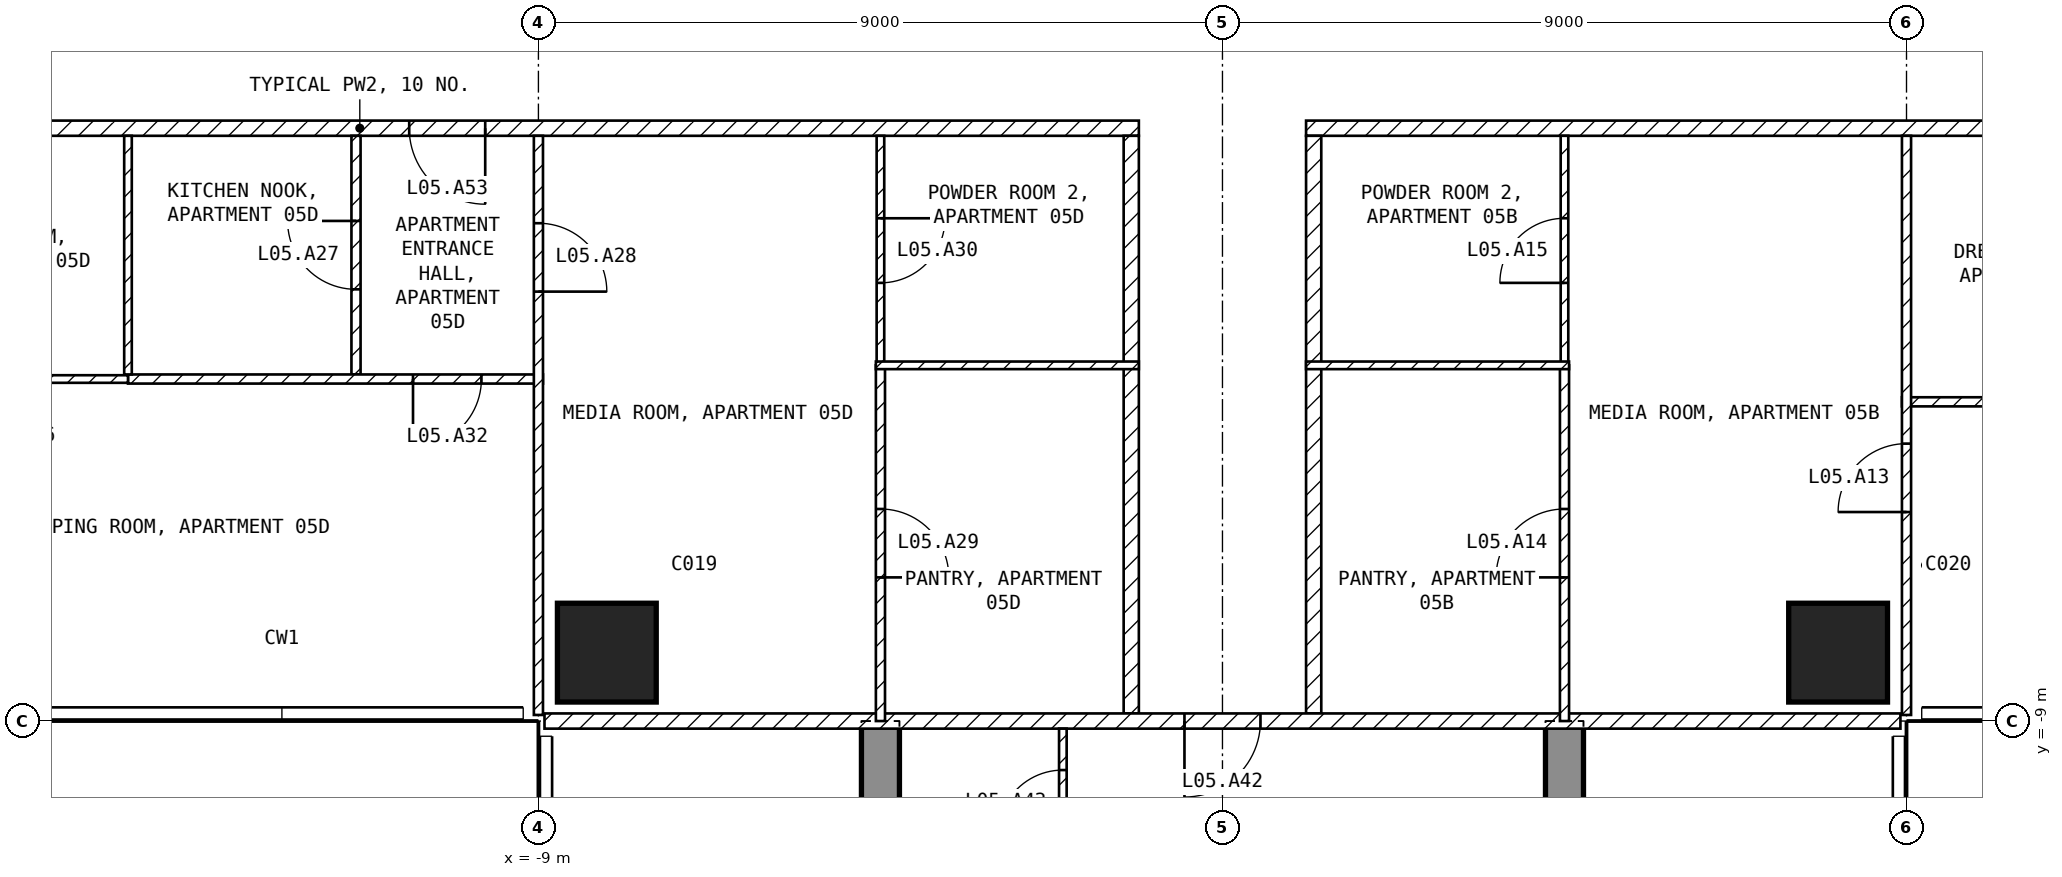
"""IFC4 building model, lengths in metres.
Left out: names, types, materials, properties, quantities, classifications, styles, units other than length and angle.
Written with IfcOpenShell. Run it as: python <this file> out.ifc"""

import sys

from ifc_helpers import new_model, si_unit, direction, frame, frame_2d, origin, origin_2d, place, context, subcontext, project, spatial, polyline, rectangle, outline, extrude, element, fill, save


model = new_model("IFC4")
c1 = context("Model", 3, precision=1e-05, world=origin(), true_north=direction((0.0, 1.0)))
c2 = subcontext(c1, "Body", "Model", "MODEL_VIEW")
j1 = project(units=[si_unit("LENGTHUNIT", "METRE"), si_unit("PLANEANGLEUNIT", "RADIAN")], contexts=[c1])
p1 = place(None, origin())
s1 = spatial("IfcSite", under=j1, at=p1, CompositionType="ELEMENT")
p2 = place(p1, origin())
s2 = spatial("IfcBuilding", under=s1, at=p2, CompositionType="ELEMENT")
p3 = place(p2, frame((0.0, 0.0, 36.5)))
s3 = spatial("IfcBuildingStorey", under=s2, at=p3, CompositionType="ELEMENT", Elevation=36.5)
for number, where, z_axis, x_axis in (
    (1, (-8.1, -8.1, -0.25), (0.0, 0.0, 1.0), (1.0, 0.0, 0.0)),
    (2, (8.1, -8.1, -0.25), (0.0, 0.0, 1.0), (1.0, 0.0, 0.0)),
):
    element("IfcColumn", number, at=place(p3, frame(where, z_axis=z_axis, x_axis=x_axis)), inside=s3, PredefinedType="COLUMN", context=c2, shape_type="SweptSolid", body=[
        extrude(rectangle(XDim=1.3, YDim=1.3, at=origin_2d()), origin(), (0.0, 0.0, 1.0), 3.5),
    ])
for number, where, z_axis, x_axis in (
    (3, (-4.75, -25.45, -0.25), (1.0, 0.0, 0.0), (0.0, 1.0, 0.0)),
    (4, (4.25, -25.45, -0.25), (1.0, 0.0, 0.0), (0.0, 1.0, 0.0)),
):
    element("IfcWall", number, at=place(p3, frame(where, z_axis=z_axis, x_axis=x_axis)), inside=s3, PredefinedType="SHEAR", context=c2, shape_type="SweptSolid", body=[
        extrude(outline(polyline([(0.0, 0.0), (4.15, 0.0), (4.15, 2.65), (6.55, 2.65), (6.55, 0.0), (11.95, 0.0), (11.95, 2.65), (14.35, 2.65), (14.35, 0.0), (16.45, 0.0), (16.45, 3.5), (0.0, 3.5), (0.0, 0.0)])), origin(), (0.0, 0.0, 1.0), 0.5),
    ])
p4 = place(p3, frame((21.6, -1.2, 0.0), z_axis=(0.0, 0.0, 1.0), x_axis=(-1.0, 0.0, 0.0)))
e5 = element("IfcWall", 5, at=p4, inside=s3, PredefinedType="PARTITIONING", context=c2, shape_type="SweptSolid", body=[
    extrude(rectangle(XDim=20.5, YDim=0.2, at=frame_2d((10.25, 0.0))), origin(), (0.0, 0.0, 1.0), 3.25),
])
p5 = place(p4, frame((7.075, 0.0, 0.0)))
e6 = element("IfcOpeningElement", 6, at=p5, cuts=e5, PredefinedType="OPENING", context=c2, shape_type="SweptSolid", body=[
    extrude(rectangle(XDim=1.0, YDim=2.1, at=frame_2d((0.5, 1.05))), frame((0.0, 0.11, 0.0), z_axis=(0.0, -1.0, 0.0), x_axis=(1.0, 0.0, 0.0)), (0.0, 0.0, 1.0), 0.22),
])
p6 = place(p3, frame((1.2, -1.3, 0.0), z_axis=(0.0, 0.0, 1.0), x_axis=(0.0, -1.0, 0.0)))
e7 = element("IfcWall", 7, at=p6, inside=s3, PredefinedType="PARTITIONING", context=c2, shape_type="SweptSolid", body=[
    extrude(rectangle(XDim=7.6, YDim=0.2, at=frame_2d((3.8, 0.0))), origin(), (0.0, 0.0, 1.0), 3.25),
])
p7 = place(p3, frame((-1.1, -1.2, 0.0), z_axis=(0.0, 0.0, 1.0), x_axis=(-1.0, 0.0, 0.0)))
e8 = element("IfcWall", 8, at=p7, inside=s3, PredefinedType="PARTITIONING", context=c2, shape_type="SweptSolid", body=[
    extrude(rectangle(XDim=20.5, YDim=0.2, at=frame_2d((10.25, 0.0))), origin(), (0.0, 0.0, 1.0), 3.25),
])
p8 = place(p7, frame((8.6, 0.0, 0.0)))
e9 = element("IfcOpeningElement", 9, at=p8, cuts=e8, PredefinedType="OPENING", context=c2, shape_type="SweptSolid", body=[
    extrude(rectangle(XDim=1.0, YDim=2.1, at=frame_2d((0.5, 1.05))), frame((0.0, 0.11, 0.0), z_axis=(0.0, -1.0, 0.0), x_axis=(1.0, 0.0, 0.0)), (0.0, 0.0, 1.0), 0.22),
])
p9 = place(p3, frame((-1.2, -8.9, 0.0), z_axis=(0.0, 0.0, 1.0), x_axis=(0.0, 1.0, 0.0)))
e10 = element("IfcWall", 10, at=p9, inside=s3, PredefinedType="PARTITIONING", context=c2, shape_type="SweptSolid", body=[
    extrude(rectangle(XDim=7.6, YDim=0.2, at=frame_2d((3.8, 0.0))), origin(), (0.0, 0.0, 1.0), 3.25),
])
p10 = place(p3, frame((8.92, -9.0, 0.0), z_axis=(0.0, 0.0, 1.0), x_axis=(-1.0, 0.0, 0.0)))
e11 = element("IfcWall", 11, at=p10, inside=s3, PredefinedType="PARTITIONING", context=c2, shape_type="SweptSolid", body=[
    extrude(rectangle(XDim=17.84, YDim=0.2, at=frame_2d((8.92, 0.0))), origin(), (0.0, 0.0, 1.0), 3.25),
])
p11 = place(p10, frame((8.42, 0.0, 0.0)))
e12 = element("IfcOpeningElement", 12, at=p11, cuts=e11, PredefinedType="OPENING", context=c2, shape_type="SweptSolid", body=[
    extrude(rectangle(XDim=1.0, YDim=2.1, at=frame_2d((0.5, 1.05))), frame((0.0, 0.11, 0.0), z_axis=(0.0, -1.0, 0.0), x_axis=(1.0, 0.0, 0.0)), (0.0, 0.0, 1.0), 0.22),
])
p12 = place(p3, frame((19.2, -4.8, 0.0), z_axis=(0.0, 0.0, 1.0), x_axis=(-1.0, 0.0, 0.0)))
e13 = element("IfcWall", 13, at=p12, inside=s3, PredefinedType="PARTITIONING", context=c2, shape_type="SweptSolid", body=[
    extrude(rectangle(XDim=10.26, YDim=0.12, at=frame_2d((5.13, 0.0))), origin(), (0.0, 0.0, 1.0), 3.25),
])
p13 = place(p12, frame((4.725, 0.0, 0.0)))
e14 = element("IfcOpeningElement", 14, at=p13, cuts=e13, PredefinedType="OPENING", context=c2, shape_type="SweptSolid", body=[
    extrude(rectangle(XDim=0.9, YDim=2.1, at=frame_2d((0.45, 1.05))), frame((0.0, 0.07, 0.0), z_axis=(0.0, -1.0, 0.0), x_axis=(1.0, 0.0, 0.0)), (0.0, 0.0, 1.0), 0.14),
])
p14 = place(p3, frame((9.0, -8.92, 0.0), z_axis=(0.0, 0.0, 1.0), x_axis=(0.0, 1.0, 0.0)))
e15 = element("IfcWall", 15, at=p14, inside=s3, PredefinedType="PARTITIONING", context=c2, shape_type="SweptSolid", body=[
    extrude(rectangle(XDim=7.62, YDim=0.12, at=frame_2d((3.81, 0.0))), origin(), (0.0, 0.0, 1.0), 3.25),
])
p15 = place(p14, frame((2.67, 0.0, 0.0)))
e16 = element("IfcOpeningElement", 16, at=p15, cuts=e15, PredefinedType="OPENING", context=c2, shape_type="SweptSolid", body=[
    extrude(rectangle(XDim=0.9, YDim=2.1, at=frame_2d((0.45, 1.05))), frame((0.0, 0.07, 0.0), z_axis=(0.0, -1.0, 0.0), x_axis=(1.0, 0.0, 0.0)), (0.0, 0.0, 1.0), 0.14),
])
p16 = place(p3, frame((4.5, -4.32, 0.0), z_axis=(0.0, 0.0, 1.0), x_axis=(0.0, 1.0, 0.0)))
e17 = element("IfcWall", 17, at=p16, inside=s3, PredefinedType="PARTITIONING", context=c2, shape_type="SweptSolid", body=[
    extrude(rectangle(XDim=3.02, YDim=0.1, at=frame_2d((1.51, 0.0))), origin(), (0.0, 0.0, 1.0), 3.25),
])
p17 = place(p16, frame((1.085, 0.0, 0.0)))
e18 = element("IfcOpeningElement", 18, at=p17, cuts=e17, PredefinedType="OPENING", context=c2, shape_type="SweptSolid", body=[
    extrude(rectangle(XDim=0.85, YDim=2.1, at=frame_2d((0.425, 1.05))), frame((0.0, 0.06, 0.0), z_axis=(0.0, -1.0, 0.0), x_axis=(1.0, 0.0, 0.0)), (0.0, 0.0, 1.0), 0.12),
])
p18 = place(p3, frame((4.5, -9.0, 0.0), z_axis=(0.0, 0.0, 1.0), x_axis=(0.0, 1.0, 0.0)))
e19 = element("IfcWall", 19, at=p18, inside=s3, PredefinedType="PARTITIONING", context=c2, shape_type="SweptSolid", body=[
    extrude(rectangle(XDim=4.68, YDim=0.12, at=frame_2d((2.34, 0.0))), origin(), (0.0, 0.0, 1.0), 3.25),
])
p19 = place(p18, frame((1.89, 0.0, 0.0)))
e20 = element("IfcOpeningElement", 20, at=p19, cuts=e19, PredefinedType="OPENING", context=c2, shape_type="SweptSolid", body=[
    extrude(rectangle(XDim=0.9, YDim=2.1, at=frame_2d((0.45, 1.05))), frame((0.0, 0.07, 0.0), z_axis=(0.0, -1.0, 0.0), x_axis=(1.0, 0.0, 0.0)), (0.0, 0.0, 1.0), 0.14),
])
p20 = place(p3, frame((4.56, -4.32, 0.0), z_axis=(0.0, 0.0, 1.0), x_axis=(-1.0, 0.0, 0.0)))
e21 = element("IfcWall", 21, at=p20, inside=s3, PredefinedType="PARTITIONING", context=c2, shape_type="SweptSolid", body=[
    extrude(rectangle(XDim=3.46, YDim=0.1, at=frame_2d((1.73, 0.0))), origin(), (0.0, 0.0, 1.0), 3.25),
])
p21 = place(p3, frame((-11.4, -4.44, 0.0), z_axis=(0.0, 0.0, 1.0), x_axis=(0.0, 1.0, 0.0)))
e22 = element("IfcWall", 22, at=p21, inside=s3, PredefinedType="PARTITIONING", context=c2, shape_type="SweptSolid", body=[
    extrude(rectangle(XDim=3.14, YDim=0.12, at=frame_2d((1.57, 0.0))), origin(), (0.0, 0.0, 1.0), 3.25),
])
p22 = place(p21, frame((1.12, 0.0, 0.0)))
e23 = element("IfcOpeningElement", 23, at=p22, cuts=e22, PredefinedType="OPENING", context=c2, shape_type="SweptSolid", body=[
    extrude(rectangle(XDim=0.9, YDim=2.1, at=frame_2d((0.45, 1.05))), frame((0.0, 0.07, 0.0), z_axis=(0.0, -1.0, 0.0), x_axis=(1.0, 0.0, 0.0)), (0.0, 0.0, 1.0), 0.14),
])
p23 = place(p3, frame((-8.94, -4.5, 0.0), z_axis=(0.0, 0.0, 1.0), x_axis=(-1.0, 0.0, 0.0)))
e24 = element("IfcWall", 24, at=p23, inside=s3, PredefinedType="PARTITIONING", context=c2, shape_type="SweptSolid", body=[
    extrude(rectangle(XDim=5.46, YDim=0.12, at=frame_2d((2.73, 0.0))), origin(), (0.0, 0.0, 1.0), 3.25),
])
p24 = place(p23, frame((0.81, 0.0, 0.0)))
e25 = element("IfcOpeningElement", 25, at=p24, cuts=e24, PredefinedType="OPENING", context=c2, shape_type="SweptSolid", body=[
    extrude(rectangle(XDim=0.9, YDim=2.1, at=frame_2d((0.45, 1.05))), frame((0.0, 0.07, 0.0), z_axis=(0.0, -1.0, 0.0), x_axis=(1.0, 0.0, 0.0)), (0.0, 0.0, 1.0), 0.14),
])
p25 = place(p3, frame((-9.0, -1.3, 0.0), z_axis=(0.0, 0.0, 1.0), x_axis=(0.0, -1.0, 0.0)))
e26 = element("IfcWall", 26, at=p25, inside=s3, PredefinedType="PARTITIONING", context=c2, shape_type="SweptSolid", body=[
    extrude(rectangle(XDim=7.62, YDim=0.12, at=frame_2d((3.81, 0.0))), origin(), (0.0, 0.0, 1.0), 3.25),
])
p26 = place(p25, frame((1.15, 0.0, 0.0)))
e27 = element("IfcOpeningElement", 27, at=p26, cuts=e26, PredefinedType="OPENING", context=c2, shape_type="SweptSolid", body=[
    extrude(rectangle(XDim=0.9, YDim=2.1, at=frame_2d((0.45, 1.05))), frame((0.0, 0.07, 0.0), z_axis=(0.0, -1.0, 0.0), x_axis=(1.0, 0.0, 0.0)), (0.0, 0.0, 1.0), 0.14),
])
p27 = place(p3, frame((-14.4, -4.44, 0.0), z_axis=(0.0, 0.0, 1.0), x_axis=(0.0, 1.0, 0.0)))
e28 = element("IfcWall", 28, at=p27, inside=s3, PredefinedType="PARTITIONING", context=c2, shape_type="SweptSolid", body=[
    extrude(rectangle(XDim=3.14, YDim=0.1, at=frame_2d((1.57, 0.0))), origin(), (0.0, 0.0, 1.0), 3.25),
])
p28 = place(p3, frame((-14.4, -4.5, 0.0), z_axis=(0.0, 0.0, 1.0), x_axis=(-1.0, 0.0, 0.0)))
e29 = element("IfcWall", 29, at=p28, inside=s3, PredefinedType="PARTITIONING", context=c2, shape_type="SweptSolid", body=[
    extrude(rectangle(XDim=3.0, YDim=0.1, at=frame_2d((1.5, 0.0))), origin(), (0.0, 0.0, 1.0), 3.25),
])
p29 = place(p28, frame((1.075, 0.0, 0.0)))
e30 = element("IfcOpeningElement", 30, at=p29, cuts=e29, PredefinedType="OPENING", context=c2, shape_type="SweptSolid", body=[
    extrude(rectangle(XDim=0.85, YDim=2.1, at=frame_2d((0.425, 1.05))), frame((0.0, 0.06, 0.0), z_axis=(0.0, -1.0, 0.0), x_axis=(1.0, 0.0, 0.0)), (0.0, 0.0, 1.0), 0.12),
])
p30 = place(p3, frame((-4.5, -1.3, 0.0), z_axis=(0.0, 0.0, 1.0), x_axis=(0.0, -1.0, 0.0)))
e31 = element("IfcWall", 31, at=p30, inside=s3, PredefinedType="PARTITIONING", context=c2, shape_type="SweptSolid", body=[
    extrude(rectangle(XDim=3.02, YDim=0.1, at=frame_2d((1.51, 0.0))), origin(), (0.0, 0.0, 1.0), 3.25),
])
p31 = place(p30, frame((1.085, 0.0, 0.0)))
e32 = element("IfcOpeningElement", 32, at=p31, cuts=e31, PredefinedType="OPENING", context=c2, shape_type="SweptSolid", body=[
    extrude(rectangle(XDim=0.85, YDim=2.1, at=frame_2d((0.425, 1.05))), frame((0.0, 0.06, 0.0), z_axis=(0.0, -1.0, 0.0), x_axis=(1.0, 0.0, 0.0)), (0.0, 0.0, 1.0), 0.12),
])
p32 = place(p3, frame((-4.5, -4.32, 0.0), z_axis=(0.0, 0.0, 1.0), x_axis=(0.0, -1.0, 0.0)))
e33 = element("IfcWall", 33, at=p32, inside=s3, PredefinedType="PARTITIONING", context=c2, shape_type="SweptSolid", body=[
    extrude(rectangle(XDim=4.68, YDim=0.12, at=frame_2d((2.34, 0.0))), origin(), (0.0, 0.0, 1.0), 3.25),
])
p33 = place(p32, frame((1.89, 0.0, 0.0)))
e34 = element("IfcOpeningElement", 34, at=p33, cuts=e33, PredefinedType="OPENING", context=c2, shape_type="SweptSolid", body=[
    extrude(rectangle(XDim=0.9, YDim=2.1, at=frame_2d((0.45, 1.05))), frame((0.0, 0.07, 0.0), z_axis=(0.0, -1.0, 0.0), x_axis=(1.0, 0.0, 0.0)), (0.0, 0.0, 1.0), 0.14),
])
p34 = place(p3, frame((-1.1, -4.32, 0.0), z_axis=(0.0, 0.0, 1.0), x_axis=(-1.0, 0.0, 0.0)))
e35 = element("IfcWall", 35, at=p34, inside=s3, PredefinedType="PARTITIONING", context=c2, shape_type="SweptSolid", body=[
    extrude(rectangle(XDim=3.46, YDim=0.1, at=frame_2d((1.73, 0.0))), origin(), (0.0, 0.0, 1.0), 3.25),
])
p35 = place(p3, frame((-2.1, -11.04, 0.0), z_axis=(0.0, 0.0, 1.0), x_axis=(0.0, 1.0, 0.0)))
e36 = element("IfcWall", 36, at=p35, inside=s3, PredefinedType="PARTITIONING", context=c2, shape_type="SweptSolid", body=[
    extrude(rectangle(XDim=1.94, YDim=0.1, at=frame_2d((0.97, 0.0))), origin(), (0.0, 0.0, 1.0), 3.25),
])
p36 = place(p35, frame((0.545, 0.0, 0.0)))
e37 = element("IfcOpeningElement", 37, at=p36, cuts=e36, PredefinedType="OPENING", context=c2, shape_type="SweptSolid", body=[
    extrude(rectangle(XDim=0.85, YDim=2.1, at=frame_2d((0.425, 1.05))), frame((0.0, 0.06, 0.0), z_axis=(0.0, -1.0, 0.0), x_axis=(1.0, 0.0, 0.0)), (0.0, 0.0, 1.0), 0.12),
])
p37 = place(p15, origin())
e38 = element("IfcDoor", 38, at=p37, inside=s3, OperationType="SINGLE_SWING_LEFT", PredefinedType="DOOR", context=c2, shape_type="SweptSolid", body=[
    extrude(rectangle(XDim=0.9, YDim=2.1, at=frame_2d((0.45, 1.05))), frame((0.0, 0.025, 0.0), z_axis=(0.0, -1.0, 0.0), x_axis=(1.0, 0.0, 0.0)), (0.0, 0.0, 1.0), 0.05),
])
fill(e16, e38)
p38 = place(p19, origin())
e39 = element("IfcDoor", 39, at=p38, inside=s3, OperationType="SINGLE_SWING_LEFT", PredefinedType="DOOR", context=c2, shape_type="SweptSolid", body=[
    extrude(rectangle(XDim=0.9, YDim=2.1, at=frame_2d((0.45, 1.05))), frame((0.0, 0.025, 0.0), z_axis=(0.0, -1.0, 0.0), x_axis=(1.0, 0.0, 0.0)), (0.0, 0.0, 1.0), 0.05),
])
fill(e20, e39)
p39 = place(p17, origin())
e40 = element("IfcDoor", 40, at=p39, inside=s3, OperationType="SINGLE_SWING_LEFT", PredefinedType="DOOR", context=c2, shape_type="SweptSolid", body=[
    extrude(rectangle(XDim=0.85, YDim=2.1, at=frame_2d((0.425, 1.05))), frame((0.0, 0.025, 0.0), z_axis=(0.0, -1.0, 0.0), x_axis=(1.0, 0.0, 0.0)), (0.0, 0.0, 1.0), 0.05),
])
fill(e18, e40)
p40 = place(p22, origin())
e41 = element("IfcDoor", 41, at=p40, inside=s3, OperationType="SINGLE_SWING_RIGHT", PredefinedType="DOOR", context=c2, shape_type="SweptSolid", body=[
    extrude(rectangle(XDim=0.9, YDim=2.1, at=frame_2d((0.45, 1.05))), frame((0.0, 0.025, 0.0), z_axis=(0.0, -1.0, 0.0), x_axis=(1.0, 0.0, 0.0)), (0.0, 0.0, 1.0), 0.05),
])
fill(e23, e41)
p41 = place(p26, origin())
e42 = element("IfcDoor", 42, at=p41, inside=s3, OperationType="SINGLE_SWING_RIGHT", PredefinedType="DOOR", context=c2, shape_type="SweptSolid", body=[
    extrude(rectangle(XDim=0.9, YDim=2.1, at=frame_2d((0.45, 1.05))), frame((0.0, 0.025, 0.0), z_axis=(0.0, -1.0, 0.0), x_axis=(1.0, 0.0, 0.0)), (0.0, 0.0, 1.0), 0.05),
])
fill(e27, e42)
p42 = place(p33, origin())
e43 = element("IfcDoor", 43, at=p42, inside=s3, OperationType="SINGLE_SWING_RIGHT", PredefinedType="DOOR", context=c2, shape_type="SweptSolid", body=[
    extrude(rectangle(XDim=0.9, YDim=2.1, at=frame_2d((0.45, 1.05))), frame((0.0, 0.025, 0.0), z_axis=(0.0, -1.0, 0.0), x_axis=(1.0, 0.0, 0.0)), (0.0, 0.0, 1.0), 0.05),
])
fill(e34, e43)
p43 = place(p31, origin())
e44 = element("IfcDoor", 44, at=p43, inside=s3, OperationType="SINGLE_SWING_LEFT", PredefinedType="DOOR", context=c2, shape_type="SweptSolid", body=[
    extrude(rectangle(XDim=0.85, YDim=2.1, at=frame_2d((0.425, 1.05))), frame((0.0, 0.025, 0.0), z_axis=(0.0, -1.0, 0.0), x_axis=(1.0, 0.0, 0.0)), (0.0, 0.0, 1.0), 0.05),
])
fill(e32, e44)
p44 = place(p24, origin())
e45 = element("IfcDoor", 45, at=p44, inside=s3, OperationType="SINGLE_SWING_RIGHT", PredefinedType="DOOR", context=c2, shape_type="SweptSolid", body=[
    extrude(rectangle(XDim=0.9, YDim=2.1, at=frame_2d((0.45, 1.05))), frame((0.0, 0.025, 0.0), z_axis=(0.0, -1.0, 0.0), x_axis=(1.0, 0.0, 0.0)), (0.0, 0.0, 1.0), 0.05),
])
fill(e25, e45)
p45 = place(p11, origin())
e46 = element("IfcDoor", 46, at=p45, inside=s3, OperationType="SINGLE_SWING_RIGHT", PredefinedType="DOOR", context=c2, shape_type="SweptSolid", body=[
    extrude(rectangle(XDim=1.0, YDim=2.1, at=frame_2d((0.5, 1.05))), frame((0.0, 0.025, 0.0), z_axis=(0.0, -1.0, 0.0), x_axis=(1.0, 0.0, 0.0)), (0.0, 0.0, 1.0), 0.05),
])
fill(e12, e46)
p46 = place(p36, origin())
e47 = element("IfcDoor", 47, at=p46, inside=s3, OperationType="SINGLE_SWING_LEFT", PredefinedType="DOOR", context=c2, shape_type="SweptSolid", body=[
    extrude(rectangle(XDim=0.85, YDim=2.1, at=frame_2d((0.425, 1.05))), frame((0.0, 0.025, 0.0), z_axis=(0.0, -1.0, 0.0), x_axis=(1.0, 0.0, 0.0)), (0.0, 0.0, 1.0), 0.05),
])
fill(e37, e47)
p47 = place(p8, origin())
e48 = element("IfcDoor", 48, at=p47, inside=s3, OperationType="SINGLE_SWING_LEFT", PredefinedType="DOOR", context=c2, shape_type="SweptSolid", body=[
    extrude(rectangle(XDim=1.0, YDim=2.1, at=frame_2d((0.5, 1.05))), frame((0.0, 0.025, 0.0), z_axis=(0.0, -1.0, 0.0), x_axis=(1.0, 0.0, 0.0)), (0.0, 0.0, 1.0), 0.05),
])
fill(e9, e48)
save(model, sys.argv[1])
